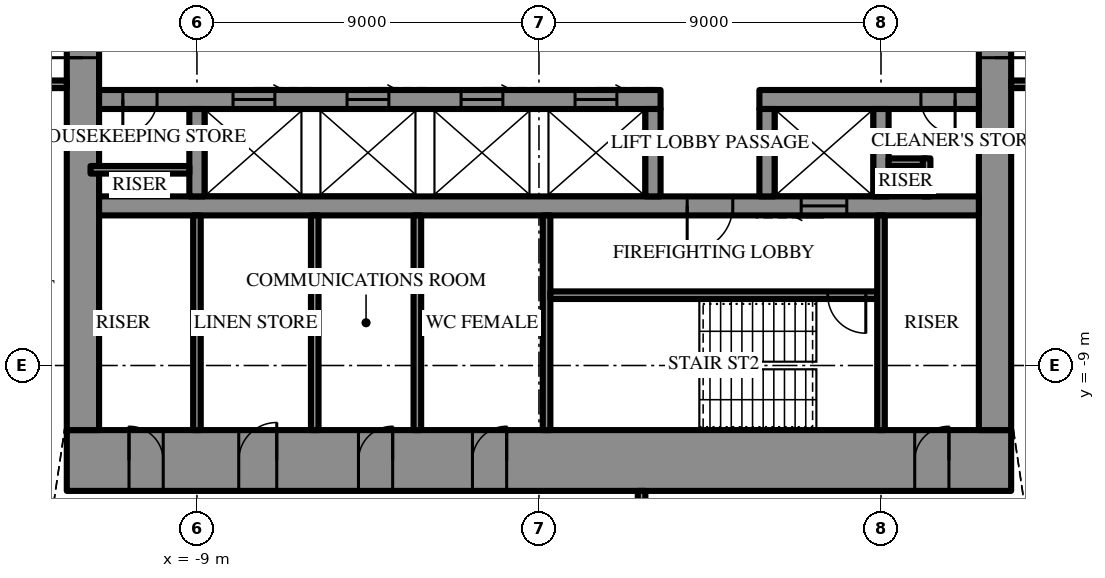
"""IFC4 building model, lengths in metres.
Left out: names, types, materials, properties, quantities, classifications, styles, units other than length and angle.
Written with IfcOpenShell. Run it as: python <this file> out.ifc"""

import sys

from ifc_helpers import new_model, si_unit, direction, frame, frame_2d, origin, place, context, subcontext, project, spatial, rectangle, extrude, element, fill, save


model = new_model("IFC4")
c1 = context("Model", 3, precision=1e-05, world=origin(), true_north=direction((0.0, 1.0)))
c2 = subcontext(c1, "Body", "Model", "MODEL_VIEW")
j1 = project(units=[si_unit("LENGTHUNIT", "METRE"), si_unit("PLANEANGLEUNIT", "RADIAN")], contexts=[c1])
p1 = place(None, origin())
s1 = spatial("IfcSite", under=j1, at=p1, CompositionType="ELEMENT")
p2 = place(p1, origin())
s2 = spatial("IfcBuilding", under=s1, at=p2, CompositionType="ELEMENT")
p3 = place(p2, frame((0.0, 0.0, 336.7)))
s3 = spatial("IfcBuildingStorey", under=s2, at=p3, CompositionType="ELEMENT", Elevation=336.7)
p4 = place(p3, frame((12.425, -11.5, 0.0), z_axis=(0.0, 0.0, 1.0), x_axis=(-1.0, 0.0, 0.0)))
e1 = element("IfcWall", 1, at=p4, inside=s3, PredefinedType="SHEAR", context=c2, shape_type="SweptSolid", body=[
    extrude(rectangle(XDim=24.85, YDim=1.6, at=frame_2d((12.425, 0.0))), origin(), (0.0, 0.0, 1.0), 4.2),
])
p5 = place(p4, frame((13.275, 0.0, 0.0)))
e2 = element("IfcOpeningElement", 2, at=p5, cuts=e1, PredefinedType="OPENING", context=c2, shape_type="SweptSolid", body=[
    extrude(rectangle(XDim=0.9, YDim=2.2, at=frame_2d((0.45, 1.1))), frame((0.0, 0.81, 0.0), z_axis=(0.0, -1.0, 0.0), x_axis=(1.0, 0.0, 0.0)), (0.0, 0.0, 1.0), 1.62),
])
p6 = place(p4, frame((16.275, 0.0, 0.0)))
e3 = element("IfcOpeningElement", 3, at=p6, cuts=e1, PredefinedType="OPENING", context=c2, shape_type="SweptSolid", body=[
    extrude(rectangle(XDim=0.9, YDim=2.2, at=frame_2d((0.45, 1.1))), frame((0.0, 0.81, 0.0), z_axis=(0.0, -1.0, 0.0), x_axis=(1.0, 0.0, 0.0)), (0.0, 0.0, 1.0), 1.62),
])
p7 = place(p4, frame((19.325, 0.0, 0.0)))
e4 = element("IfcOpeningElement", 4, at=p7, cuts=e1, PredefinedType="OPENING", context=c2, shape_type="SweptSolid", body=[
    extrude(rectangle(XDim=1.0, YDim=2.2, at=frame_2d((0.5, 1.1))), frame((0.0, 0.81, 0.0), z_axis=(0.0, -1.0, 0.0), x_axis=(1.0, 0.0, 0.0)), (0.0, 0.0, 1.0), 1.62),
])
p8 = place(p4, frame((1.637, 0.0, 0.0)))
e5 = element("IfcOpeningElement", 5, at=p8, cuts=e1, PredefinedType="OPENING", context=c2, shape_type="SweptSolid", body=[
    extrude(rectangle(XDim=0.9, YDim=2.2, at=frame_2d((0.45, 1.1))), frame((0.0, 0.81, 0.0), z_axis=(0.0, -1.0, 0.0), x_axis=(1.0, 0.0, 0.0)), (0.0, 0.0, 1.0), 1.62),
])
p9 = place(p4, frame((22.312, 0.0, 0.0)))
e6 = element("IfcOpeningElement", 6, at=p9, cuts=e1, PredefinedType="OPENING", context=c2, shape_type="SweptSolid", body=[
    extrude(rectangle(XDim=0.9, YDim=2.2, at=frame_2d((0.45, 1.1))), frame((0.0, 0.81, 0.0), z_axis=(0.0, -1.0, 0.0), x_axis=(1.0, 0.0, 0.0)), (0.0, 0.0, 1.0), 1.62),
])
p10 = place(p3, frame((12.0, -10.7, 0.0), z_axis=(0.0, 0.0, 1.0), x_axis=(0.0, 1.0, 0.0)))
e7 = element("IfcWall", 7, at=p10, inside=s3, PredefinedType="SHEAR", context=c2, shape_type="SweptSolid", body=[
    extrude(rectangle(XDim=21.4, YDim=0.85, at=frame_2d((10.7, 0.0))), origin(), (0.0, 0.0, 1.0), 4.2),
])
p11 = place(p10, frame((9.8, 0.0, 0.0)))
e8 = element("IfcOpeningElement", 8, at=p11, cuts=e7, PredefinedType="OPENING", context=c2, shape_type="SweptSolid", body=[
    extrude(rectangle(XDim=1.8, YDim=2.4, at=frame_2d((0.9, 1.2))), frame((0.0, 0.435, 0.0), z_axis=(0.0, -1.0, 0.0), x_axis=(1.0, 0.0, 0.0)), (0.0, 0.0, 1.0), 0.87),
])
p12 = place(p3, frame((-12.0, 10.7, 0.0), z_axis=(0.0, 0.0, 1.0), x_axis=(0.0, -1.0, 0.0)))
e9 = element("IfcWall", 9, at=p12, inside=s3, PredefinedType="SHEAR", context=c2, shape_type="SweptSolid", body=[
    extrude(rectangle(XDim=21.4, YDim=0.85, at=frame_2d((10.7, 0.0))), origin(), (0.0, 0.0, 1.0), 4.2),
])
p13 = place(p12, frame((9.8, 0.0, 0.0)))
e10 = element("IfcOpeningElement", 10, at=p13, cuts=e9, PredefinedType="OPENING", context=c2, shape_type="SweptSolid", body=[
    extrude(rectangle(XDim=1.8, YDim=2.4, at=frame_2d((0.9, 1.2))), frame((0.0, 0.435, 0.0), z_axis=(0.0, -1.0, 0.0), x_axis=(1.0, 0.0, 0.0)), (0.0, 0.0, 1.0), 0.87),
])
p14 = place(p3, frame((11.575, -2.0, 0.0), z_axis=(0.0, 0.0, 1.0), x_axis=(-1.0, 0.0, 0.0)))
e11 = element("IfcWall", 11, at=p14, inside=s3, PredefinedType="SHEAR", context=c2, shape_type="SweptSolid", body=[
    extrude(rectangle(XDim=5.775, YDim=0.5, at=frame_2d((2.887, 0.0))), origin(), (0.0, 0.0, 1.0), 4.2),
])
p15 = place(p14, frame((0.625, 0.0, 0.0)))
e12 = element("IfcOpeningElement", 12, at=p15, cuts=e11, PredefinedType="OPENING", context=c2, shape_type="SweptSolid", body=[
    extrude(rectangle(XDim=0.9, YDim=2.2, at=frame_2d((0.45, 1.1))), frame((0.0, 0.26, 0.0), z_axis=(0.0, -1.0, 0.0), x_axis=(1.0, 0.0, 0.0)), (0.0, 0.0, 1.0), 0.52),
])
p16 = place(p3, frame((3.2, -2.0, 0.0), z_axis=(0.0, 0.0, 1.0), x_axis=(-1.0, 0.0, 0.0)))
e13 = element("IfcWall", 13, at=p16, inside=s3, PredefinedType="SHEAR", context=c2, shape_type="SweptSolid", body=[
    extrude(rectangle(XDim=14.775, YDim=0.5, at=frame_2d((7.387, 0.0))), origin(), (0.0, 0.0, 1.0), 4.2),
])
p17 = place(p16, frame((13.25, 0.0, 0.0)))
e14 = element("IfcOpeningElement", 14, at=p17, cuts=e13, PredefinedType="OPENING", context=c2, shape_type="SweptSolid", body=[
    extrude(rectangle(XDim=0.9, YDim=2.2, at=frame_2d((0.45, 1.1))), frame((0.0, 0.26, 0.0), z_axis=(0.0, -1.0, 0.0), x_axis=(1.0, 0.0, 0.0)), (0.0, 0.0, 1.0), 0.52),
])
p18 = place(p16, frame((1.15, 0.0, 0.0)))
e15 = element("IfcOpeningElement", 15, at=p18, cuts=e13, PredefinedType="OPENING", context=c2, shape_type="SweptSolid", body=[
    extrude(rectangle(XDim=1.1, YDim=2.2, at=frame_2d((0.55, 1.1))), frame((0.0, 0.26, 0.0), z_axis=(0.0, -1.0, 0.0), x_axis=(1.0, 0.0, 0.0)), (0.0, 0.0, 1.0), 0.52),
])
p19 = place(p16, frame((4.15, 0.0, 0.0)))
e16 = element("IfcOpeningElement", 16, at=p19, cuts=e13, PredefinedType="OPENING", context=c2, shape_type="SweptSolid", body=[
    extrude(rectangle(XDim=1.1, YDim=2.2, at=frame_2d((0.55, 1.1))), frame((0.0, 0.26, 0.0), z_axis=(0.0, -1.0, 0.0), x_axis=(1.0, 0.0, 0.0)), (0.0, 0.0, 1.0), 0.52),
])
p20 = place(p16, frame((7.15, 0.0, 0.0)))
e17 = element("IfcOpeningElement", 17, at=p20, cuts=e13, PredefinedType="OPENING", context=c2, shape_type="SweptSolid", body=[
    extrude(rectangle(XDim=1.1, YDim=2.2, at=frame_2d((0.55, 1.1))), frame((0.0, 0.26, 0.0), z_axis=(0.0, -1.0, 0.0), x_axis=(1.0, 0.0, 0.0)), (0.0, 0.0, 1.0), 0.52),
])
p21 = place(p16, frame((10.15, 0.0, 0.0)))
e18 = element("IfcOpeningElement", 18, at=p21, cuts=e13, PredefinedType="OPENING", context=c2, shape_type="SweptSolid", body=[
    extrude(rectangle(XDim=1.1, YDim=2.2, at=frame_2d((0.55, 1.1))), frame((0.0, 0.26, 0.0), z_axis=(0.0, -1.0, 0.0), x_axis=(1.0, 0.0, 0.0)), (0.0, 0.0, 1.0), 0.52),
])
p22 = place(p3, frame((11.575, -4.8, 0.0), z_axis=(0.0, 0.0, 1.0), x_axis=(-1.0, 0.0, 0.0)))
e19 = element("IfcWall", 19, at=p22, inside=s3, PredefinedType="SHEAR", context=c2, shape_type="SweptSolid", body=[
    extrude(rectangle(XDim=23.15, YDim=0.5, at=frame_2d((11.575, 0.0))), origin(), (0.0, 0.0, 1.0), 4.2),
])
p23 = place(p22, frame((6.475, 0.0, 0.0)))
e20 = element("IfcOpeningElement", 20, at=p23, cuts=e19, PredefinedType="OPENING", context=c2, shape_type="SweptSolid", body=[
    extrude(rectangle(XDim=1.2, YDim=2.2, at=frame_2d((0.6, 1.1))), frame((0.0, 0.26, 0.0), z_axis=(0.0, -1.0, 0.0), x_axis=(1.0, 0.0, 0.0)), (0.0, 0.0, 1.0), 0.52),
])
p24 = place(p22, frame((3.475, 0.0, 0.0)))
e21 = element("IfcOpeningElement", 21, at=p24, cuts=e19, PredefinedType="OPENING", context=c2, shape_type="SweptSolid", body=[
    extrude(rectangle(XDim=1.2, YDim=2.2, at=frame_2d((0.6, 1.1))), frame((0.0, 0.26, 0.0), z_axis=(0.0, -1.0, 0.0), x_axis=(1.0, 0.0, 0.0)), (0.0, 0.0, 1.0), 0.52),
])
for number, where, z_axis, x_axis in (
    (22, (9.0, -2.25, 0.0), (0.0, 0.0, 1.0), (0.0, -1.0, 0.0)),
    (23, (6.0, -2.25, 0.0), (0.0, 0.0, 1.0), (0.0, -1.0, 0.0)),
    (24, (3.0, -2.25, 0.0), (0.0, 0.0, 1.0), (0.0, -1.0, 0.0)),
    (25, (-9.0, -2.25, 0.0), (0.0, 0.0, 1.0), (0.0, -1.0, 0.0)),
):
    element("IfcWall", number, at=place(p3, frame(where, z_axis=z_axis, x_axis=x_axis)), inside=s3, PredefinedType="SHEAR", context=c2, shape_type="SweptSolid", body=[
        extrude(rectangle(XDim=2.3, YDim=0.4, at=frame_2d((1.15, 0.0))), origin(), (0.0, 0.0, 1.0), 4.2),
    ])
p25 = place(p3, frame((0.2, -5.05, 0.0), z_axis=(0.0, 0.0, 1.0), x_axis=(0.0, -1.0, 0.0)))
e26 = element("IfcWall", 26, at=p25, inside=s3, PredefinedType="SHEAR", context=c2, shape_type="SweptSolid", body=[
    extrude(rectangle(XDim=5.65, YDim=0.2, at=frame_2d((2.825, 0.0))), origin(), (0.0, 0.0, 1.0), 4.2),
])
p26 = place(p3, frame((8.9, -7.15, 0.0), z_axis=(0.0, 0.0, 1.0), x_axis=(-1.0, 0.0, 0.0)))
e27 = element("IfcWall", 27, at=p26, inside=s3, PredefinedType="SHEAR", context=c2, shape_type="SweptSolid", body=[
    extrude(rectangle(XDim=8.6, YDim=0.2, at=frame_2d((4.3, 0.0))), origin(), (0.0, 0.0, 1.0), 4.2),
])
p27 = place(p26, frame((0.3, 0.0, 0.0)))
e28 = element("IfcOpeningElement", 28, at=p27, cuts=e27, PredefinedType="OPENING", context=c2, shape_type="SweptSolid", body=[
    extrude(rectangle(XDim=1.0, YDim=2.2, at=frame_2d((0.5, 1.1))), frame((0.0, 0.11, 0.0), z_axis=(0.0, -1.0, 0.0), x_axis=(1.0, 0.0, 0.0)), (0.0, 0.0, 1.0), 0.22),
])
for number, where, z_axis, x_axis in (
    (29, (9.0, -5.05, 0.0), (0.0, 0.0, 1.0), (0.0, -1.0, 0.0)),
    (30, (-9.0, -5.05, 0.0), (0.0, 0.0, 1.0), (0.0, -1.0, 0.0)),
    (31, (-3.2, -5.05, 0.0), (0.0, 0.0, 1.0), (0.0, -1.0, 0.0)),
    (32, (-5.9, -5.05, 0.0), (0.0, 0.0, 1.0), (0.0, -1.0, 0.0)),
):
    element("IfcWall", number, at=place(p3, frame(where, z_axis=z_axis, x_axis=x_axis)), inside=s3, PredefinedType="PARTITIONING", context=c2, shape_type="SweptSolid", body=[
        extrude(rectangle(XDim=5.65, YDim=0.2, at=frame_2d((2.825, 0.0))), origin(), (0.0, 0.0, 1.0), 4.0),
    ])
for number, where, z_axis, x_axis in (
    (33, (10.2, -3.65, 0.0), (0.0, 0.0, 1.0), (-1.0, 0.0, 0.0)),
    (34, (10.2, -3.55, 0.0), (0.0, 0.0, 1.0), (0.0, -1.0, 0.0)),
):
    element("IfcWall", number, at=place(p3, frame(where, z_axis=z_axis, x_axis=x_axis)), inside=s3, PredefinedType="PARTITIONING", context=c2, shape_type="SweptSolid", body=[
        extrude(rectangle(XDim=1.0, YDim=0.2, at=frame_2d((0.5, 0.0))), origin(), (0.0, 0.0, 1.0), 4.0),
    ])
p28 = place(p3, frame((-9.2, -3.85, 0.0), z_axis=(0.0, 0.0, 1.0), x_axis=(-1.0, 0.0, 0.0)))
e35 = element("IfcWall", 35, at=p28, inside=s3, PredefinedType="PARTITIONING", context=c2, shape_type="SweptSolid", body=[
    extrude(rectangle(XDim=2.6, YDim=0.2, at=frame_2d((1.3, 0.0))), origin(), (0.0, 0.0, 1.0), 4.0),
])
p29 = place(p3, frame((2.7, -12.3, 0.0), z_axis=(0.0, 0.0, 1.0), x_axis=(0.0, -1.0, 0.0)))
e36 = element("IfcWall", 36, at=p29, inside=s3, PredefinedType="PARTITIONING", context=c2, shape_type="SweptSolid", body=[
    extrude(rectangle(XDim=1.7, YDim=0.2, at=frame_2d((0.85, 0.0))), origin(), (0.0, 0.0, 1.0), 4.0),
])
p30 = place(p29, frame((0.35, 0.0, 0.0)))
e37 = element("IfcOpeningElement", 37, at=p30, cuts=e36, PredefinedType="OPENING", context=c2, shape_type="SweptSolid", body=[
    extrude(rectangle(XDim=1.0, YDim=2.2, at=frame_2d((0.5, 1.1))), frame((0.0, 0.11, 0.0), z_axis=(0.0, -1.0, 0.0), x_axis=(1.0, 0.0, 0.0)), (0.0, 0.0, 1.0), 0.22),
])
p31 = place(p3, frame((12.425, -1.6, 0.0), z_axis=(0.0, 0.0, 1.0), x_axis=(1.0, 0.0, 0.0)))
e38 = element("IfcWall", 38, at=p31, inside=s3, PredefinedType="PARTITIONING", context=c2, shape_type="SweptSolid", body=[
    extrude(rectangle(XDim=16.5, YDim=0.2, at=frame_2d((8.25, 0.0))), origin(), (0.0, 0.0, 1.0), 4.0),
])
p32 = place(p31, frame((1.15, 0.0, 0.0)))
e39 = element("IfcOpeningElement", 39, at=p32, cuts=e38, PredefinedType="OPENING", context=c2, shape_type="SweptSolid", body=[
    extrude(rectangle(XDim=1.0, YDim=2.2, at=frame_2d((0.5, 1.1))), frame((0.0, 0.11, 0.0), z_axis=(0.0, -1.0, 0.0), x_axis=(1.0, 0.0, 0.0)), (0.0, 0.0, 1.0), 0.22),
])
p33 = place(p3, frame((-12.425, -1.6, 0.0), z_axis=(0.0, 0.0, 1.0), x_axis=(-1.0, 0.0, 0.0)))
e40 = element("IfcWall", 40, at=p33, inside=s3, PredefinedType="PARTITIONING", context=c2, shape_type="SweptSolid", body=[
    extrude(rectangle(XDim=16.5, YDim=0.2, at=frame_2d((8.25, 0.0))), origin(), (0.0, 0.0, 1.0), 4.0),
])
p34 = place(p33, frame((1.15, 0.0, 0.0)))
e41 = element("IfcOpeningElement", 41, at=p34, cuts=e40, PredefinedType="OPENING", context=c2, shape_type="SweptSolid", body=[
    extrude(rectangle(XDim=1.0, YDim=2.2, at=frame_2d((0.5, 1.1))), frame((0.0, 0.11, 0.0), z_axis=(0.0, -1.0, 0.0), x_axis=(1.0, 0.0, 0.0)), (0.0, 0.0, 1.0), 0.22),
])
p35 = place(p11, frame((1.8, 0.0, 0.0), z_axis=(0.0, 0.0, 1.0), x_axis=(-1.0, 0.0, 0.0)))
e42 = element("IfcDoor", 42, at=p35, inside=s3, OperationType="DOUBLE_DOOR_SINGLE_SWING", PredefinedType="DOOR", context=c2, shape_type="SweptSolid", body=[
    extrude(rectangle(XDim=1.8, YDim=2.4, at=frame_2d((0.9, 1.2))), frame((0.0, 0.025, 0.0), z_axis=(0.0, -1.0, 0.0), x_axis=(1.0, 0.0, 0.0)), (0.0, 0.0, 1.0), 0.05),
])
fill(e8, e42)
p36 = place(p13, frame((1.8, 0.0, 0.0), z_axis=(0.0, 0.0, 1.0), x_axis=(-1.0, 0.0, 0.0)))
e43 = element("IfcDoor", 43, at=p36, inside=s3, OperationType="DOUBLE_DOOR_SINGLE_SWING", PredefinedType="DOOR", context=c2, shape_type="SweptSolid", body=[
    extrude(rectangle(XDim=1.8, YDim=2.4, at=frame_2d((0.9, 1.2))), frame((0.0, 0.025, 0.0), z_axis=(0.0, -1.0, 0.0), x_axis=(1.0, 0.0, 0.0)), (0.0, 0.0, 1.0), 0.05),
])
fill(e10, e43)
p37 = place(p23, origin())
e44 = element("IfcDoor", 44, at=p37, inside=s3, OperationType="SINGLE_SWING_LEFT", PredefinedType="DOOR", context=c2, shape_type="SweptSolid", body=[
    extrude(rectangle(XDim=1.2, YDim=2.2, at=frame_2d((0.6, 1.1))), frame((0.0, 0.025, 0.0), z_axis=(0.0, -1.0, 0.0), x_axis=(1.0, 0.0, 0.0)), (0.0, 0.0, 1.0), 0.05),
])
fill(e20, e44)
p38 = place(p27, origin())
e45 = element("IfcDoor", 45, at=p38, inside=s3, OperationType="SINGLE_SWING_RIGHT", PredefinedType="DOOR", context=c2, shape_type="SweptSolid", body=[
    extrude(rectangle(XDim=1.0, YDim=2.2, at=frame_2d((0.5, 1.1))), frame((0.0, 0.025, 0.0), z_axis=(0.0, -1.0, 0.0), x_axis=(1.0, 0.0, 0.0)), (0.0, 0.0, 1.0), 0.05),
])
fill(e28, e45)
p39 = place(p5, frame((0.9, 0.0, 0.0), z_axis=(0.0, 0.0, 1.0), x_axis=(-1.0, 0.0, 0.0)))
e46 = element("IfcDoor", 46, at=p39, inside=s3, OperationType="SINGLE_SWING_LEFT", PredefinedType="DOOR", context=c2, shape_type="SweptSolid", body=[
    extrude(rectangle(XDim=0.9, YDim=2.2, at=frame_2d((0.45, 1.1))), frame((0.0, 0.025, 0.0), z_axis=(0.0, -1.0, 0.0), x_axis=(1.0, 0.0, 0.0)), (0.0, 0.0, 1.0), 0.05),
])
fill(e2, e46)
p40 = place(p6, frame((0.9, 0.0, 0.0), z_axis=(0.0, 0.0, 1.0), x_axis=(-1.0, 0.0, 0.0)))
e47 = element("IfcDoor", 47, at=p40, inside=s3, OperationType="SINGLE_SWING_LEFT", PredefinedType="DOOR", context=c2, shape_type="SweptSolid", body=[
    extrude(rectangle(XDim=0.9, YDim=2.2, at=frame_2d((0.45, 1.1))), frame((0.0, 0.025, 0.0), z_axis=(0.0, -1.0, 0.0), x_axis=(1.0, 0.0, 0.0)), (0.0, 0.0, 1.0), 0.05),
])
fill(e3, e47)
p41 = place(p7, frame((1.0, 0.0, 0.0), z_axis=(0.0, 0.0, 1.0), x_axis=(-1.0, 0.0, 0.0)))
e48 = element("IfcDoor", 48, at=p41, inside=s3, OperationType="SINGLE_SWING_LEFT", PredefinedType="DOOR", context=c2, shape_type="SweptSolid", body=[
    extrude(rectangle(XDim=1.0, YDim=2.2, at=frame_2d((0.5, 1.1))), frame((0.0, 0.025, 0.0), z_axis=(0.0, -1.0, 0.0), x_axis=(1.0, 0.0, 0.0)), (0.0, 0.0, 1.0), 0.05),
])
fill(e4, e48)
p42 = place(p8, frame((0.9, 0.0, 0.0), z_axis=(0.0, 0.0, 1.0), x_axis=(-1.0, 0.0, 0.0)))
e49 = element("IfcDoor", 49, at=p42, inside=s3, OperationType="SINGLE_SWING_LEFT", PredefinedType="DOOR", context=c2, shape_type="SweptSolid", body=[
    extrude(rectangle(XDim=0.9, YDim=2.2, at=frame_2d((0.45, 1.1))), frame((0.0, 0.025, 0.0), z_axis=(0.0, -1.0, 0.0), x_axis=(1.0, 0.0, 0.0)), (0.0, 0.0, 1.0), 0.05),
])
fill(e5, e49)
p43 = place(p9, frame((0.9, 0.0, 0.0), z_axis=(0.0, 0.0, 1.0), x_axis=(-1.0, 0.0, 0.0)))
e50 = element("IfcDoor", 50, at=p43, inside=s3, OperationType="SINGLE_SWING_RIGHT", PredefinedType="DOOR", context=c2, shape_type="SweptSolid", body=[
    extrude(rectangle(XDim=0.9, YDim=2.2, at=frame_2d((0.45, 1.1))), frame((0.0, 0.025, 0.0), z_axis=(0.0, -1.0, 0.0), x_axis=(1.0, 0.0, 0.0)), (0.0, 0.0, 1.0), 0.05),
])
fill(e6, e50)
p44 = place(p15, origin())
e51 = element("IfcDoor", 51, at=p44, inside=s3, OperationType="SINGLE_SWING_RIGHT", PredefinedType="DOOR", context=c2, shape_type="SweptSolid", body=[
    extrude(rectangle(XDim=0.9, YDim=2.2, at=frame_2d((0.45, 1.1))), frame((0.0, 0.025, 0.0), z_axis=(0.0, -1.0, 0.0), x_axis=(1.0, 0.0, 0.0)), (0.0, 0.0, 1.0), 0.05),
])
fill(e12, e51)
p45 = place(p17, origin())
e52 = element("IfcDoor", 52, at=p45, inside=s3, OperationType="SINGLE_SWING_LEFT", PredefinedType="DOOR", context=c2, shape_type="SweptSolid", body=[
    extrude(rectangle(XDim=0.9, YDim=2.2, at=frame_2d((0.45, 1.1))), frame((0.0, 0.025, 0.0), z_axis=(0.0, -1.0, 0.0), x_axis=(1.0, 0.0, 0.0)), (0.0, 0.0, 1.0), 0.05),
])
fill(e14, e52)
p46 = place(p24, origin())
e53 = element("IfcDoor", 53, at=p46, inside=s3, OperationType="SLIDING_TO_LEFT", PredefinedType="DOOR", context=c2, shape_type="SweptSolid", body=[
    extrude(rectangle(XDim=1.2, YDim=2.2, at=frame_2d((0.6, 1.1))), frame((0.0, 0.025, 0.0), z_axis=(0.0, -1.0, 0.0), x_axis=(1.0, 0.0, 0.0)), (0.0, 0.0, 1.0), 0.05),
])
fill(e21, e53)
p47 = place(p18, frame((1.1, 0.0, 0.0), z_axis=(0.0, 0.0, 1.0), x_axis=(-1.0, 0.0, 0.0)))
e54 = element("IfcDoor", 54, at=p47, inside=s3, OperationType="SLIDING_TO_LEFT", PredefinedType="DOOR", context=c2, shape_type="SweptSolid", body=[
    extrude(rectangle(XDim=1.1, YDim=2.2, at=frame_2d((0.55, 1.1))), frame((0.0, 0.025, 0.0), z_axis=(0.0, -1.0, 0.0), x_axis=(1.0, 0.0, 0.0)), (0.0, 0.0, 1.0), 0.05),
])
fill(e15, e54)
p48 = place(p19, frame((1.1, 0.0, 0.0), z_axis=(0.0, 0.0, 1.0), x_axis=(-1.0, 0.0, 0.0)))
e55 = element("IfcDoor", 55, at=p48, inside=s3, OperationType="SLIDING_TO_LEFT", PredefinedType="DOOR", context=c2, shape_type="SweptSolid", body=[
    extrude(rectangle(XDim=1.1, YDim=2.2, at=frame_2d((0.55, 1.1))), frame((0.0, 0.025, 0.0), z_axis=(0.0, -1.0, 0.0), x_axis=(1.0, 0.0, 0.0)), (0.0, 0.0, 1.0), 0.05),
])
fill(e16, e55)
p49 = place(p20, frame((1.1, 0.0, 0.0), z_axis=(0.0, 0.0, 1.0), x_axis=(-1.0, 0.0, 0.0)))
e56 = element("IfcDoor", 56, at=p49, inside=s3, OperationType="SLIDING_TO_LEFT", PredefinedType="DOOR", context=c2, shape_type="SweptSolid", body=[
    extrude(rectangle(XDim=1.1, YDim=2.2, at=frame_2d((0.55, 1.1))), frame((0.0, 0.025, 0.0), z_axis=(0.0, -1.0, 0.0), x_axis=(1.0, 0.0, 0.0)), (0.0, 0.0, 1.0), 0.05),
])
fill(e17, e56)
p50 = place(p21, frame((1.1, 0.0, 0.0), z_axis=(0.0, 0.0, 1.0), x_axis=(-1.0, 0.0, 0.0)))
e57 = element("IfcDoor", 57, at=p50, inside=s3, OperationType="SLIDING_TO_LEFT", PredefinedType="DOOR", context=c2, shape_type="SweptSolid", body=[
    extrude(rectangle(XDim=1.1, YDim=2.2, at=frame_2d((0.55, 1.1))), frame((0.0, 0.025, 0.0), z_axis=(0.0, -1.0, 0.0), x_axis=(1.0, 0.0, 0.0)), (0.0, 0.0, 1.0), 0.05),
])
fill(e18, e57)
save(model, sys.argv[1])
